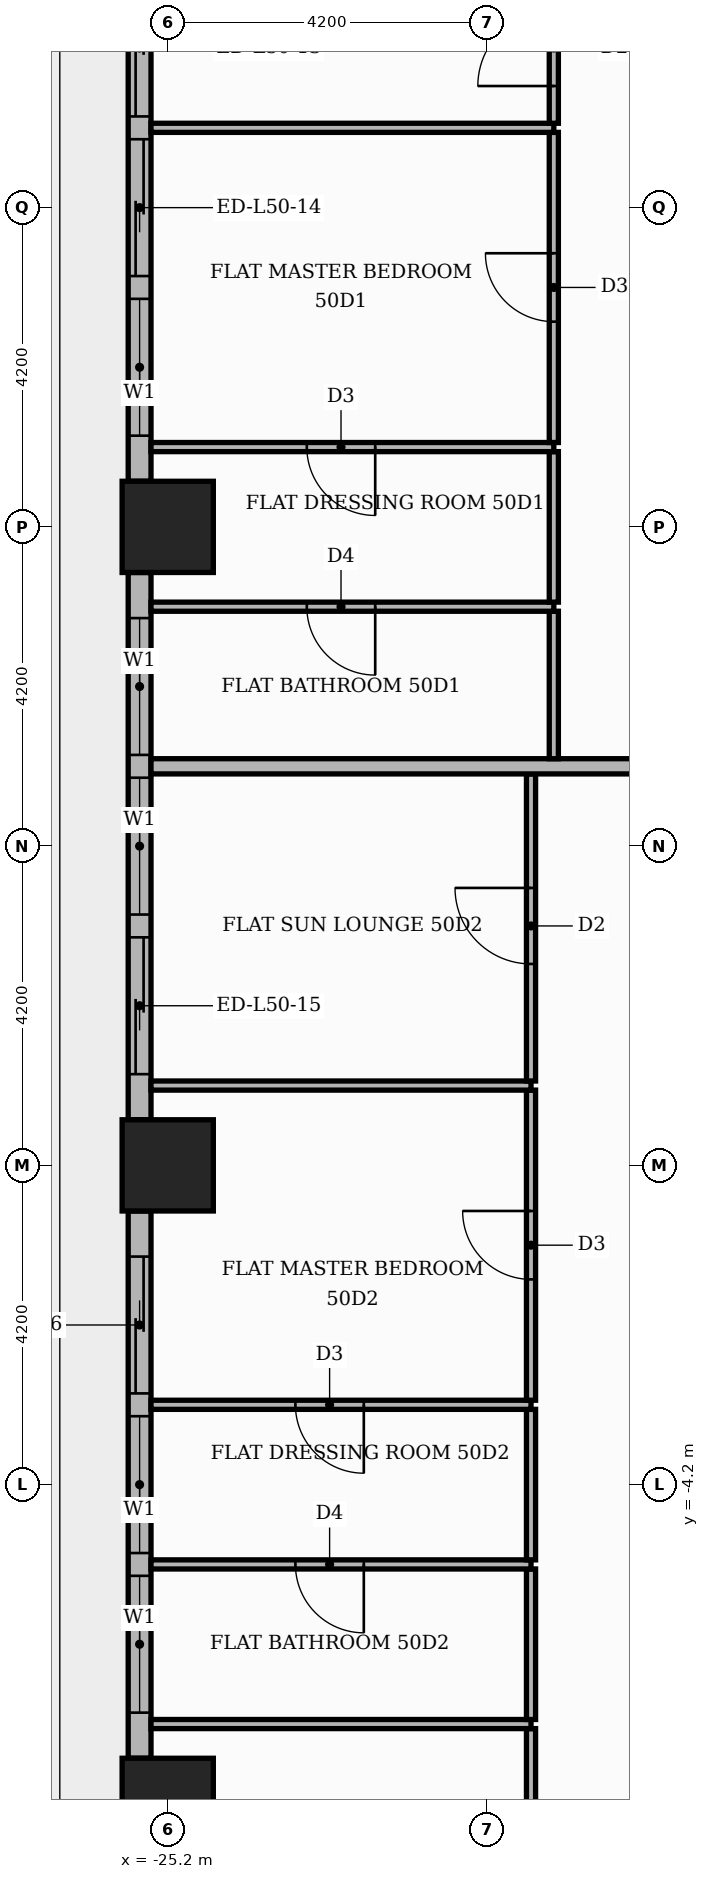
"""IFC4 building model, lengths in metres.
Left out: names, types, materials, properties, quantities, classifications, styles, units other than length and angle.
Written with IfcOpenShell. Run it as: python <this file> out.ifc"""

import sys

from ifc_helpers import new_model, si_unit, direction, frame, frame_2d, origin, origin_2d, place, context, subcontext, project, spatial, rectangle, extrude, element, fill, save


model = new_model("IFC4")
c1 = context("Model", 3, precision=1e-05, world=origin(), true_north=direction((0.0, 1.0)))
c2 = subcontext(c1, "Body", "Model", "MODEL_VIEW")
j1 = project(units=[si_unit("LENGTHUNIT", "METRE"), si_unit("PLANEANGLEUNIT", "RADIAN")], contexts=[c1])
p1 = place(None, origin())
s1 = spatial("IfcSite", under=j1, at=p1, CompositionType="ELEMENT")
p2 = place(p1, origin())
s2 = spatial("IfcBuilding", under=s1, at=p2, CompositionType="ELEMENT")
p3 = place(p2, frame((0.0, 0.0, 211.8)))
s3 = spatial("IfcBuildingStorey", under=s2, at=p3, CompositionType="ELEMENT", Elevation=211.8)
for number, where, z_axis, x_axis in (
    (1, (-25.2, 0.0, 0.0), (0.0, 0.0, 1.0), (1.0, 0.0, 0.0)),
    (2, (-25.2, -8.4, 0.0), (0.0, 0.0, 1.0), (1.0, 0.0, 0.0)),
    (3, (-25.2, 8.4, 0.0), (0.0, 0.0, 1.0), (1.0, 0.0, 0.0)),
):
    element("IfcColumn", number, at=place(p3, frame(where, z_axis=z_axis, x_axis=x_axis)), inside=s3, PredefinedType="COLUMN", context=c2, shape_type="SweptSolid", body=[
        extrude(rectangle(XDim=1.2, YDim=1.2, at=origin_2d()), origin(), (0.0, 0.0, 1.0), 3.9),
    ])
p4 = place(p3, frame((-25.57, 16.2, 0.0), z_axis=(0.0, 0.0, 1.0), x_axis=(0.0, -1.0, 0.0)))
e4 = element("IfcWall", 4, at=p4, inside=s3, PredefinedType="STANDARD", context=c2, shape_type="SweptSolid", body=[
    extrude(rectangle(XDim=7.2, YDim=0.3, at=frame_2d((3.6, 0.0))), origin(), (0.0, 0.0, 1.0), 3.48),
])
p5 = place(p4, frame((0.6, 0.0, 0.0)))
e5 = element("IfcOpeningElement", 5, at=p5, cuts=e4, PredefinedType="OPENING", context=c2, shape_type="SweptSolid", body=[
    extrude(rectangle(XDim=1.8, YDim=2.4, at=frame_2d((0.9, 1.2))), frame((0.0, 0.16, 0.0), z_axis=(0.0, -1.0, 0.0), x_axis=(1.0, 0.0, 0.0)), (0.0, 0.0, 1.0), 0.32),
])
p6 = place(p4, frame((2.7, 0.0, 0.0)))
e6 = element("IfcOpeningElement", 6, at=p6, cuts=e4, PredefinedType="OPENING", context=c2, shape_type="SweptSolid", body=[
    extrude(rectangle(XDim=1.8, YDim=2.4, at=frame_2d((0.9, 1.2))), frame((0.0, 0.16, 0.0), z_axis=(0.0, -1.0, 0.0), x_axis=(1.0, 0.0, 0.0)), (0.0, 0.0, 1.0), 0.32),
])
p7 = place(p4, frame((4.8, 0.0, 0.9)))
e7 = element("IfcOpeningElement", 7, at=p7, cuts=e4, PredefinedType="OPENING", context=c2, shape_type="SweptSolid", body=[
    extrude(rectangle(XDim=1.8, YDim=2.1, at=frame_2d((0.9, 1.05))), frame((0.0, 0.16, 0.0), z_axis=(0.0, -1.0, 0.0), x_axis=(1.0, 0.0, 0.0)), (0.0, 0.0, 1.0), 0.32),
])
p8 = place(p3, frame((-25.57, 7.8, 0.0), z_axis=(0.0, 0.0, 1.0), x_axis=(0.0, -1.0, 0.0)))
e8 = element("IfcWall", 8, at=p8, inside=s3, PredefinedType="STANDARD", context=c2, shape_type="SweptSolid", body=[
    extrude(rectangle(XDim=7.2, YDim=0.3, at=frame_2d((3.6, 0.0))), origin(), (0.0, 0.0, 1.0), 3.48),
])
p9 = place(p8, frame((0.6, 0.0, 0.9)))
e9 = element("IfcOpeningElement", 9, at=p9, cuts=e8, PredefinedType="OPENING", context=c2, shape_type="SweptSolid", body=[
    extrude(rectangle(XDim=1.8, YDim=2.1, at=frame_2d((0.9, 1.05))), frame((0.0, 0.16, 0.0), z_axis=(0.0, -1.0, 0.0), x_axis=(1.0, 0.0, 0.0)), (0.0, 0.0, 1.0), 0.32),
])
p10 = place(p8, frame((2.7, 0.0, 0.9)))
e10 = element("IfcOpeningElement", 10, at=p10, cuts=e8, PredefinedType="OPENING", context=c2, shape_type="SweptSolid", body=[
    extrude(rectangle(XDim=1.8, YDim=2.1, at=frame_2d((0.9, 1.05))), frame((0.0, 0.16, 0.0), z_axis=(0.0, -1.0, 0.0), x_axis=(1.0, 0.0, 0.0)), (0.0, 0.0, 1.0), 0.32),
])
p11 = place(p8, frame((4.8, 0.0, 0.0)))
e11 = element("IfcOpeningElement", 11, at=p11, cuts=e8, PredefinedType="OPENING", context=c2, shape_type="SweptSolid", body=[
    extrude(rectangle(XDim=1.8, YDim=2.4, at=frame_2d((0.9, 1.2))), frame((0.0, 0.16, 0.0), z_axis=(0.0, -1.0, 0.0), x_axis=(1.0, 0.0, 0.0)), (0.0, 0.0, 1.0), 0.32),
])
p12 = place(p3, frame((-25.57, -0.6, 0.0), z_axis=(0.0, 0.0, 1.0), x_axis=(0.0, -1.0, 0.0)))
e12 = element("IfcWall", 12, at=p12, inside=s3, PredefinedType="STANDARD", context=c2, shape_type="SweptSolid", body=[
    extrude(rectangle(XDim=7.2, YDim=0.3, at=frame_2d((3.6, 0.0))), origin(), (0.0, 0.0, 1.0), 3.48),
])
p13 = place(p12, frame((0.6, 0.0, 0.0)))
e13 = element("IfcOpeningElement", 13, at=p13, cuts=e12, PredefinedType="OPENING", context=c2, shape_type="SweptSolid", body=[
    extrude(rectangle(XDim=1.8, YDim=2.4, at=frame_2d((0.9, 1.2))), frame((0.0, 0.16, 0.0), z_axis=(0.0, -1.0, 0.0), x_axis=(1.0, 0.0, 0.0)), (0.0, 0.0, 1.0), 0.32),
])
p14 = place(p12, frame((2.7, 0.0, 0.9)))
e14 = element("IfcOpeningElement", 14, at=p14, cuts=e12, PredefinedType="OPENING", context=c2, shape_type="SweptSolid", body=[
    extrude(rectangle(XDim=1.8, YDim=2.1, at=frame_2d((0.9, 1.05))), frame((0.0, 0.16, 0.0), z_axis=(0.0, -1.0, 0.0), x_axis=(1.0, 0.0, 0.0)), (0.0, 0.0, 1.0), 0.32),
])
p15 = place(p12, frame((4.8, 0.0, 0.9)))
e15 = element("IfcOpeningElement", 15, at=p15, cuts=e12, PredefinedType="OPENING", context=c2, shape_type="SweptSolid", body=[
    extrude(rectangle(XDim=1.8, YDim=2.1, at=frame_2d((0.9, 1.05))), frame((0.0, 0.16, 0.0), z_axis=(0.0, -1.0, 0.0), x_axis=(1.0, 0.0, 0.0)), (0.0, 0.0, 1.0), 0.32),
])
p16 = place(p3, frame((-20.42, -11.49, 0.0), z_axis=(0.0, 0.0, 1.0), x_axis=(0.0, 1.0, 0.0)))
e16 = element("IfcWall", 16, at=p16, inside=s3, PredefinedType="PARTITIONING", context=c2, shape_type="SweptSolid", body=[
    extrude(rectangle(XDim=4.08, YDim=0.12, at=frame_2d((2.04, 0.0))), origin(), (0.0, 0.0, 1.0), 3.48),
])
p17 = place(p16, frame((1.59, 0.0, 0.0)))
e17 = element("IfcOpeningElement", 17, at=p17, cuts=e16, PredefinedType="OPENING", context=c2, shape_type="SweptSolid", body=[
    extrude(rectangle(XDim=0.9, YDim=2.1, at=frame_2d((0.45, 1.05))), frame((0.0, 0.07, 0.0), z_axis=(0.0, -1.0, 0.0), x_axis=(1.0, 0.0, 0.0)), (0.0, 0.0, 1.0), 0.14),
])
p18 = place(p3, frame((-25.42, -7.35, 0.0), z_axis=(0.0, 0.0, 1.0), x_axis=(1.0, 0.0, 0.0)))
e18 = element("IfcWall", 18, at=p18, inside=s3, PredefinedType="PARTITIONING", context=c2, shape_type="SweptSolid", body=[
    extrude(rectangle(XDim=5.0, YDim=0.12, at=frame_2d((2.5, 0.0))), origin(), (0.0, 0.0, 1.0), 3.48),
])
p19 = place(p3, frame((-20.42, -7.29, 0.0), z_axis=(0.0, 0.0, 1.0), x_axis=(0.0, 1.0, 0.0)))
e19 = element("IfcWall", 19, at=p19, inside=s3, PredefinedType="PARTITIONING", context=c2, shape_type="SweptSolid", body=[
    extrude(rectangle(XDim=1.98, YDim=0.12, at=frame_2d((0.99, 0.0))), origin(), (0.0, 0.0, 1.0), 3.48),
])
p20 = place(p3, frame((-25.42, -5.25, 0.0), z_axis=(0.0, 0.0, 1.0), x_axis=(1.0, 0.0, 0.0)))
e20 = element("IfcWall", 20, at=p20, inside=s3, PredefinedType="PARTITIONING", context=c2, shape_type="SweptSolid", body=[
    extrude(rectangle(XDim=5.0, YDim=0.12, at=frame_2d((2.5, 0.0))), origin(), (0.0, 0.0, 1.0), 3.48),
])
p21 = place(p20, frame((1.9, 0.0, 0.0)))
e21 = element("IfcOpeningElement", 21, at=p21, cuts=e20, PredefinedType="OPENING", context=c2, shape_type="SweptSolid", body=[
    extrude(rectangle(XDim=0.9, YDim=2.1, at=frame_2d((0.45, 1.05))), frame((0.0, 0.07, 0.0), z_axis=(0.0, -1.0, 0.0), x_axis=(1.0, 0.0, 0.0)), (0.0, 0.0, 1.0), 0.14),
])
p22 = place(p3, frame((-20.42, -5.19, 0.0), z_axis=(0.0, 0.0, 1.0), x_axis=(0.0, 1.0, 0.0)))
e22 = element("IfcWall", 22, at=p22, inside=s3, PredefinedType="PARTITIONING", context=c2, shape_type="SweptSolid", body=[
    extrude(rectangle(XDim=1.98, YDim=0.12, at=frame_2d((0.99, 0.0))), origin(), (0.0, 0.0, 1.0), 3.48),
])
p23 = place(p3, frame((-25.42, -3.15, 0.0), z_axis=(0.0, 0.0, 1.0), x_axis=(1.0, 0.0, 0.0)))
e23 = element("IfcWall", 23, at=p23, inside=s3, PredefinedType="PARTITIONING", context=c2, shape_type="SweptSolid", body=[
    extrude(rectangle(XDim=5.0, YDim=0.12, at=frame_2d((2.5, 0.0))), origin(), (0.0, 0.0, 1.0), 3.48),
])
p24 = place(p23, frame((1.9, 0.0, 0.0)))
e24 = element("IfcOpeningElement", 24, at=p24, cuts=e23, PredefinedType="OPENING", context=c2, shape_type="SweptSolid", body=[
    extrude(rectangle(XDim=0.9, YDim=2.1, at=frame_2d((0.45, 1.05))), frame((0.0, 0.07, 0.0), z_axis=(0.0, -1.0, 0.0), x_axis=(1.0, 0.0, 0.0)), (0.0, 0.0, 1.0), 0.14),
])
p25 = place(p3, frame((-20.42, -3.09, 0.0), z_axis=(0.0, 0.0, 1.0), x_axis=(0.0, 1.0, 0.0)))
e25 = element("IfcWall", 25, at=p25, inside=s3, PredefinedType="PARTITIONING", context=c2, shape_type="SweptSolid", body=[
    extrude(rectangle(XDim=4.08, YDim=0.12, at=frame_2d((2.04, 0.0))), origin(), (0.0, 0.0, 1.0), 3.48),
])
p26 = place(p25, frame((1.59, 0.0, 0.0)))
e26 = element("IfcOpeningElement", 26, at=p26, cuts=e25, PredefinedType="OPENING", context=c2, shape_type="SweptSolid", body=[
    extrude(rectangle(XDim=0.9, YDim=2.1, at=frame_2d((0.45, 1.05))), frame((0.0, 0.07, 0.0), z_axis=(0.0, -1.0, 0.0), x_axis=(1.0, 0.0, 0.0)), (0.0, 0.0, 1.0), 0.14),
])
p27 = place(p3, frame((-25.42, 1.05, 0.0), z_axis=(0.0, 0.0, 1.0), x_axis=(1.0, 0.0, 0.0)))
e27 = element("IfcWall", 27, at=p27, inside=s3, PredefinedType="PARTITIONING", context=c2, shape_type="SweptSolid", body=[
    extrude(rectangle(XDim=5.0, YDim=0.12, at=frame_2d((2.5, 0.0))), origin(), (0.0, 0.0, 1.0), 3.48),
])
p28 = place(p3, frame((-20.42, 1.11, 0.0), z_axis=(0.0, 0.0, 1.0), x_axis=(0.0, 1.0, 0.0)))
e28 = element("IfcWall", 28, at=p28, inside=s3, PredefinedType="PARTITIONING", context=c2, shape_type="SweptSolid", body=[
    extrude(rectangle(XDim=4.04, YDim=0.12, at=frame_2d((2.02, 0.0))), origin(), (0.0, 0.0, 1.0), 3.48),
])
p29 = place(p28, frame((1.54, 0.0, 0.0)))
e29 = element("IfcOpeningElement", 29, at=p29, cuts=e28, PredefinedType="OPENING", context=c2, shape_type="SweptSolid", body=[
    extrude(rectangle(XDim=1.0, YDim=2.1, at=frame_2d((0.5, 1.05))), frame((0.0, 0.07, 0.0), z_axis=(0.0, -1.0, 0.0), x_axis=(1.0, 0.0, 0.0)), (0.0, 0.0, 1.0), 0.14),
])
p30 = place(p3, frame((-25.42, 5.25, 0.0), z_axis=(0.0, 0.0, 1.0), x_axis=(1.0, 0.0, 0.0)))
e30 = element("IfcWall", 30, at=p30, inside=s3, PredefinedType="PARTITIONING", context=c2, shape_type="SweptSolid", body=[
    extrude(rectangle(XDim=11.77, YDim=0.2, at=frame_2d((5.885, 0.0))), origin(), (0.0, 0.0, 1.0), 3.48),
])
p31 = place(p3, frame((-20.12, 5.35, 0.0), z_axis=(0.0, 0.0, 1.0), x_axis=(0.0, 1.0, 0.0)))
e31 = element("IfcWall", 31, at=p31, inside=s3, PredefinedType="PARTITIONING", context=c2, shape_type="SweptSolid", body=[
    extrude(rectangle(XDim=1.94, YDim=0.12, at=frame_2d((0.97, 0.0))), origin(), (0.0, 0.0, 1.0), 3.48),
])
p32 = place(p3, frame((-25.42, 7.35, 0.0), z_axis=(0.0, 0.0, 1.0), x_axis=(1.0, 0.0, 0.0)))
e32 = element("IfcWall", 32, at=p32, inside=s3, PredefinedType="PARTITIONING", context=c2, shape_type="SweptSolid", body=[
    extrude(rectangle(XDim=5.3, YDim=0.12, at=frame_2d((2.65, 0.0))), origin(), (0.0, 0.0, 1.0), 3.48),
])
p33 = place(p32, frame((2.05, 0.0, 0.0)))
e33 = element("IfcOpeningElement", 33, at=p33, cuts=e32, PredefinedType="OPENING", context=c2, shape_type="SweptSolid", body=[
    extrude(rectangle(XDim=0.9, YDim=2.1, at=frame_2d((0.45, 1.05))), frame((0.0, 0.07, 0.0), z_axis=(0.0, -1.0, 0.0), x_axis=(1.0, 0.0, 0.0)), (0.0, 0.0, 1.0), 0.14),
])
p34 = place(p3, frame((-20.12, 7.41, 0.0), z_axis=(0.0, 0.0, 1.0), x_axis=(0.0, 1.0, 0.0)))
e34 = element("IfcWall", 34, at=p34, inside=s3, PredefinedType="PARTITIONING", context=c2, shape_type="SweptSolid", body=[
    extrude(rectangle(XDim=1.98, YDim=0.12, at=frame_2d((0.99, 0.0))), origin(), (0.0, 0.0, 1.0), 3.48),
])
p35 = place(p3, frame((-25.42, 9.45, 0.0), z_axis=(0.0, 0.0, 1.0), x_axis=(1.0, 0.0, 0.0)))
e35 = element("IfcWall", 35, at=p35, inside=s3, PredefinedType="PARTITIONING", context=c2, shape_type="SweptSolid", body=[
    extrude(rectangle(XDim=5.3, YDim=0.12, at=frame_2d((2.65, 0.0))), origin(), (0.0, 0.0, 1.0), 3.48),
])
p36 = place(p35, frame((2.05, 0.0, 0.0)))
e36 = element("IfcOpeningElement", 36, at=p36, cuts=e35, PredefinedType="OPENING", context=c2, shape_type="SweptSolid", body=[
    extrude(rectangle(XDim=0.9, YDim=2.1, at=frame_2d((0.45, 1.05))), frame((0.0, 0.07, 0.0), z_axis=(0.0, -1.0, 0.0), x_axis=(1.0, 0.0, 0.0)), (0.0, 0.0, 1.0), 0.14),
])
p37 = place(p3, frame((-20.12, 9.51, 0.0), z_axis=(0.0, 0.0, 1.0), x_axis=(0.0, 1.0, 0.0)))
e37 = element("IfcWall", 37, at=p37, inside=s3, PredefinedType="PARTITIONING", context=c2, shape_type="SweptSolid", body=[
    extrude(rectangle(XDim=4.08, YDim=0.12, at=frame_2d((2.04, 0.0))), origin(), (0.0, 0.0, 1.0), 3.48),
])
p38 = place(p37, frame((1.59, 0.0, 0.0)))
e38 = element("IfcOpeningElement", 38, at=p38, cuts=e37, PredefinedType="OPENING", context=c2, shape_type="SweptSolid", body=[
    extrude(rectangle(XDim=0.9, YDim=2.1, at=frame_2d((0.45, 1.05))), frame((0.0, 0.07, 0.0), z_axis=(0.0, -1.0, 0.0), x_axis=(1.0, 0.0, 0.0)), (0.0, 0.0, 1.0), 0.14),
])
p39 = place(p3, frame((-25.42, 13.65, 0.0), z_axis=(0.0, 0.0, 1.0), x_axis=(1.0, 0.0, 0.0)))
e39 = element("IfcWall", 39, at=p39, inside=s3, PredefinedType="PARTITIONING", context=c2, shape_type="SweptSolid", body=[
    extrude(rectangle(XDim=5.3, YDim=0.12, at=frame_2d((2.65, 0.0))), origin(), (0.0, 0.0, 1.0), 3.48),
])
p40 = place(p3, frame((-20.12, 13.71, 0.0), z_axis=(0.0, 0.0, 1.0), x_axis=(0.0, 1.0, 0.0)))
e40 = element("IfcWall", 40, at=p40, inside=s3, PredefinedType="PARTITIONING", context=c2, shape_type="SweptSolid", body=[
    extrude(rectangle(XDim=1.98, YDim=0.12, at=frame_2d((0.99, 0.0))), origin(), (0.0, 0.0, 1.0), 3.48),
])
p41 = place(p40, frame((0.49, 0.0, 0.0)))
e41 = element("IfcOpeningElement", 41, at=p41, cuts=e40, PredefinedType="OPENING", context=c2, shape_type="SweptSolid", body=[
    extrude(rectangle(XDim=1.0, YDim=2.1, at=frame_2d((0.5, 1.05))), frame((0.0, 0.07, 0.0), z_axis=(0.0, -1.0, 0.0), x_axis=(1.0, 0.0, 0.0)), (0.0, 0.0, 1.0), 0.14),
])
p42 = place(p5, origin())
e42 = element("IfcDoor", 42, at=p42, inside=s3, OperationType="SLIDING_TO_LEFT", PredefinedType="DOOR", context=c2, shape_type="SweptSolid", body=[
    extrude(rectangle(XDim=1.8, YDim=2.4, at=frame_2d((0.9, 1.2))), frame((0.0, 0.025, 0.0), z_axis=(0.0, -1.0, 0.0), x_axis=(1.0, 0.0, 0.0)), (0.0, 0.0, 1.0), 0.05),
])
fill(e5, e42)
p43 = place(p6, origin())
e43 = element("IfcDoor", 43, at=p43, inside=s3, OperationType="SLIDING_TO_RIGHT", PredefinedType="DOOR", context=c2, shape_type="SweptSolid", body=[
    extrude(rectangle(XDim=1.8, YDim=2.4, at=frame_2d((0.9, 1.2))), frame((0.0, 0.025, 0.0), z_axis=(0.0, -1.0, 0.0), x_axis=(1.0, 0.0, 0.0)), (0.0, 0.0, 1.0), 0.05),
])
fill(e6, e43)
p44 = place(p7, origin())
e44 = element("IfcWindow", 44, at=p44, inside=s3, PartitioningType="SINGLE_PANEL", PredefinedType="WINDOW", context=c2, shape_type="SweptSolid", body=[
    extrude(rectangle(XDim=1.8, YDim=2.1, at=frame_2d((0.9, 1.05))), frame((0.0, 0.03, 0.0), z_axis=(0.0, -1.0, 0.0), x_axis=(1.0, 0.0, 0.0)), (0.0, 0.0, 1.0), 0.06),
])
fill(e7, e44)
p45 = place(p9, origin())
e45 = element("IfcWindow", 45, at=p45, inside=s3, PartitioningType="SINGLE_PANEL", PredefinedType="WINDOW", context=c2, shape_type="SweptSolid", body=[
    extrude(rectangle(XDim=1.8, YDim=2.1, at=frame_2d((0.9, 1.05))), frame((0.0, 0.03, 0.0), z_axis=(0.0, -1.0, 0.0), x_axis=(1.0, 0.0, 0.0)), (0.0, 0.0, 1.0), 0.06),
])
fill(e9, e45)
p46 = place(p10, origin())
e46 = element("IfcWindow", 46, at=p46, inside=s3, PartitioningType="SINGLE_PANEL", PredefinedType="WINDOW", context=c2, shape_type="SweptSolid", body=[
    extrude(rectangle(XDim=1.8, YDim=2.1, at=frame_2d((0.9, 1.05))), frame((0.0, 0.03, 0.0), z_axis=(0.0, -1.0, 0.0), x_axis=(1.0, 0.0, 0.0)), (0.0, 0.0, 1.0), 0.06),
])
fill(e10, e46)
p47 = place(p11, origin())
e47 = element("IfcDoor", 47, at=p47, inside=s3, OperationType="SLIDING_TO_RIGHT", PredefinedType="DOOR", context=c2, shape_type="SweptSolid", body=[
    extrude(rectangle(XDim=1.8, YDim=2.4, at=frame_2d((0.9, 1.2))), frame((0.0, 0.025, 0.0), z_axis=(0.0, -1.0, 0.0), x_axis=(1.0, 0.0, 0.0)), (0.0, 0.0, 1.0), 0.05),
])
fill(e11, e47)
p48 = place(p13, origin())
e48 = element("IfcDoor", 48, at=p48, inside=s3, OperationType="SLIDING_TO_LEFT", PredefinedType="DOOR", context=c2, shape_type="SweptSolid", body=[
    extrude(rectangle(XDim=1.8, YDim=2.4, at=frame_2d((0.9, 1.2))), frame((0.0, 0.025, 0.0), z_axis=(0.0, -1.0, 0.0), x_axis=(1.0, 0.0, 0.0)), (0.0, 0.0, 1.0), 0.05),
])
fill(e13, e48)
p49 = place(p14, origin())
e49 = element("IfcWindow", 49, at=p49, inside=s3, PartitioningType="SINGLE_PANEL", PredefinedType="WINDOW", context=c2, shape_type="SweptSolid", body=[
    extrude(rectangle(XDim=1.8, YDim=2.1, at=frame_2d((0.9, 1.05))), frame((0.0, 0.03, 0.0), z_axis=(0.0, -1.0, 0.0), x_axis=(1.0, 0.0, 0.0)), (0.0, 0.0, 1.0), 0.06),
])
fill(e14, e49)
p50 = place(p15, origin())
e50 = element("IfcWindow", 50, at=p50, inside=s3, PartitioningType="SINGLE_PANEL", PredefinedType="WINDOW", context=c2, shape_type="SweptSolid", body=[
    extrude(rectangle(XDim=1.8, YDim=2.1, at=frame_2d((0.9, 1.05))), frame((0.0, 0.03, 0.0), z_axis=(0.0, -1.0, 0.0), x_axis=(1.0, 0.0, 0.0)), (0.0, 0.0, 1.0), 0.06),
])
fill(e15, e50)
p51 = place(p41, origin())
e51 = element("IfcDoor", 51, at=p51, inside=s3, OperationType="SINGLE_SWING_LEFT", PredefinedType="DOOR", context=c2, shape_type="SweptSolid", body=[
    extrude(rectangle(XDim=1.0, YDim=2.1, at=frame_2d((0.5, 1.05))), frame((0.0, 0.025, 0.0), z_axis=(0.0, -1.0, 0.0), x_axis=(1.0, 0.0, 0.0)), (0.0, 0.0, 1.0), 0.05),
])
fill(e41, e51)
p52 = place(p38, origin())
e52 = element("IfcDoor", 52, at=p52, inside=s3, OperationType="SINGLE_SWING_RIGHT", PredefinedType="DOOR", context=c2, shape_type="SweptSolid", body=[
    extrude(rectangle(XDim=0.9, YDim=2.1, at=frame_2d((0.45, 1.05))), frame((0.0, 0.025, 0.0), z_axis=(0.0, -1.0, 0.0), x_axis=(1.0, 0.0, 0.0)), (0.0, 0.0, 1.0), 0.05),
])
fill(e38, e52)
p53 = place(p36, frame((0.9, 0.0, 0.0), z_axis=(0.0, 0.0, 1.0), x_axis=(-1.0, 0.0, 0.0)))
e53 = element("IfcDoor", 53, at=p53, inside=s3, OperationType="SINGLE_SWING_RIGHT", PredefinedType="DOOR", context=c2, shape_type="SweptSolid", body=[
    extrude(rectangle(XDim=0.9, YDim=2.1, at=frame_2d((0.45, 1.05))), frame((0.0, 0.025, 0.0), z_axis=(0.0, -1.0, 0.0), x_axis=(1.0, 0.0, 0.0)), (0.0, 0.0, 1.0), 0.05),
])
fill(e36, e53)
p54 = place(p33, frame((0.9, 0.0, 0.0), z_axis=(0.0, 0.0, 1.0), x_axis=(-1.0, 0.0, 0.0)))
e54 = element("IfcDoor", 54, at=p54, inside=s3, OperationType="SINGLE_SWING_RIGHT", PredefinedType="DOOR", context=c2, shape_type="SweptSolid", body=[
    extrude(rectangle(XDim=0.9, YDim=2.1, at=frame_2d((0.45, 1.05))), frame((0.0, 0.025, 0.0), z_axis=(0.0, -1.0, 0.0), x_axis=(1.0, 0.0, 0.0)), (0.0, 0.0, 1.0), 0.05),
])
fill(e33, e54)
p55 = place(p29, origin())
e55 = element("IfcDoor", 55, at=p55, inside=s3, OperationType="SINGLE_SWING_RIGHT", PredefinedType="DOOR", context=c2, shape_type="SweptSolid", body=[
    extrude(rectangle(XDim=1.0, YDim=2.1, at=frame_2d((0.5, 1.05))), frame((0.0, 0.025, 0.0), z_axis=(0.0, -1.0, 0.0), x_axis=(1.0, 0.0, 0.0)), (0.0, 0.0, 1.0), 0.05),
])
fill(e29, e55)
p56 = place(p26, origin())
e56 = element("IfcDoor", 56, at=p56, inside=s3, OperationType="SINGLE_SWING_RIGHT", PredefinedType="DOOR", context=c2, shape_type="SweptSolid", body=[
    extrude(rectangle(XDim=0.9, YDim=2.1, at=frame_2d((0.45, 1.05))), frame((0.0, 0.025, 0.0), z_axis=(0.0, -1.0, 0.0), x_axis=(1.0, 0.0, 0.0)), (0.0, 0.0, 1.0), 0.05),
])
fill(e26, e56)
p57 = place(p24, frame((0.9, 0.0, 0.0), z_axis=(0.0, 0.0, 1.0), x_axis=(-1.0, 0.0, 0.0)))
e57 = element("IfcDoor", 57, at=p57, inside=s3, OperationType="SINGLE_SWING_RIGHT", PredefinedType="DOOR", context=c2, shape_type="SweptSolid", body=[
    extrude(rectangle(XDim=0.9, YDim=2.1, at=frame_2d((0.45, 1.05))), frame((0.0, 0.025, 0.0), z_axis=(0.0, -1.0, 0.0), x_axis=(1.0, 0.0, 0.0)), (0.0, 0.0, 1.0), 0.05),
])
fill(e24, e57)
p58 = place(p21, frame((0.9, 0.0, 0.0), z_axis=(0.0, 0.0, 1.0), x_axis=(-1.0, 0.0, 0.0)))
e58 = element("IfcDoor", 58, at=p58, inside=s3, OperationType="SINGLE_SWING_RIGHT", PredefinedType="DOOR", context=c2, shape_type="SweptSolid", body=[
    extrude(rectangle(XDim=0.9, YDim=2.1, at=frame_2d((0.45, 1.05))), frame((0.0, 0.025, 0.0), z_axis=(0.0, -1.0, 0.0), x_axis=(1.0, 0.0, 0.0)), (0.0, 0.0, 1.0), 0.05),
])
fill(e21, e58)
save(model, sys.argv[1])
